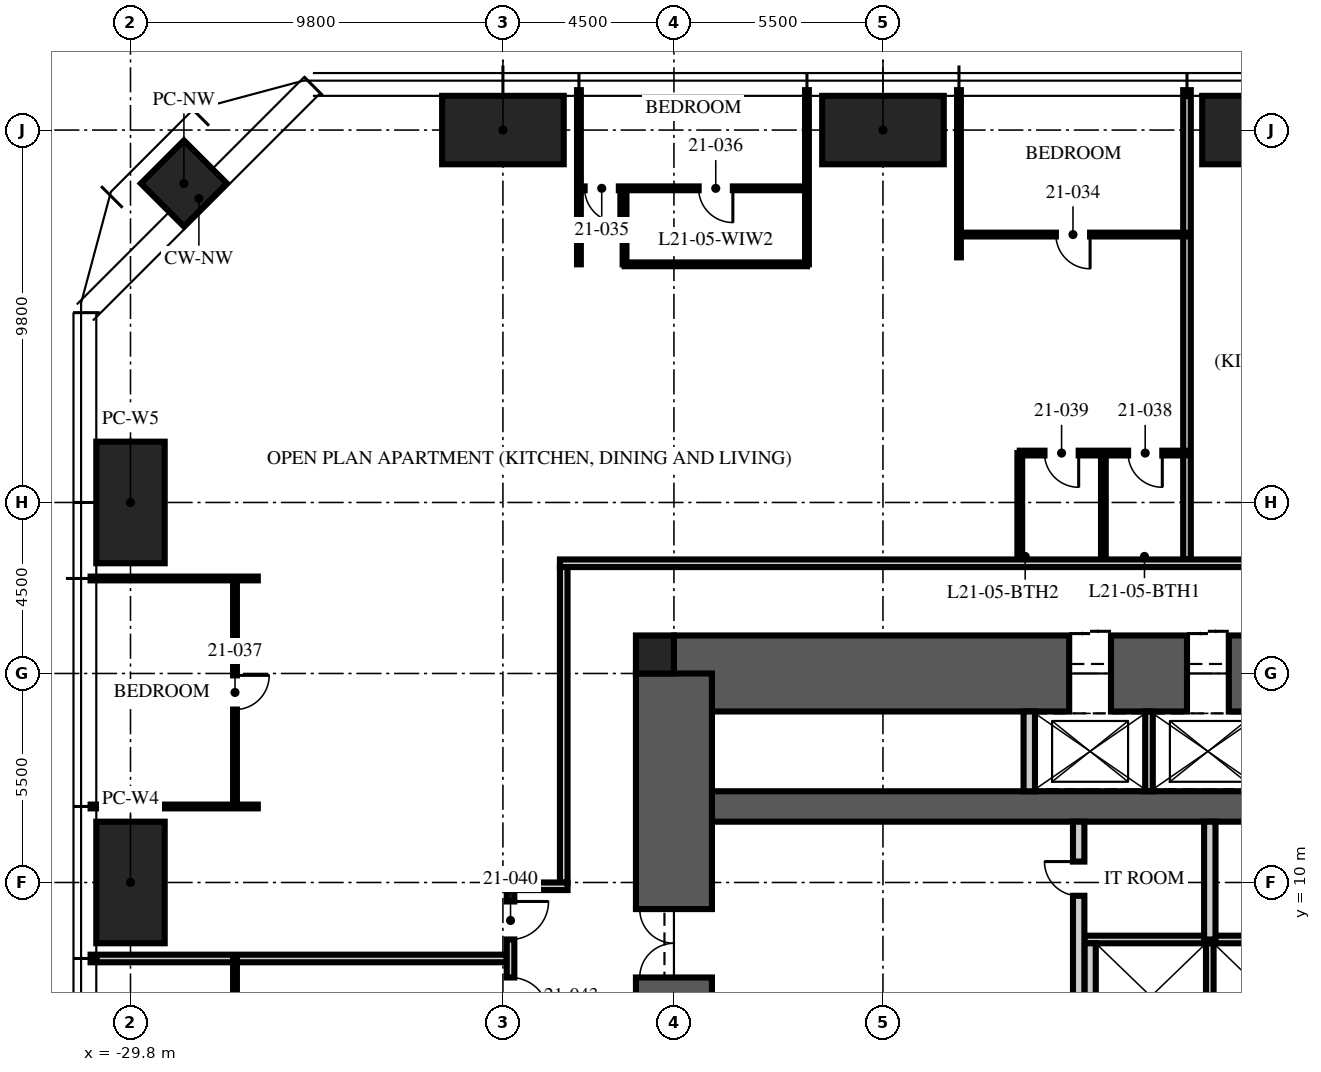
"""IFC4 building model, lengths in metres.
Left out: names, types, materials, properties, quantities, classifications, styles, units other than length and angle.
Written with IfcOpenShell. Run it as: python <this file> out.ifc"""

import sys

from ifc_helpers import new_model, si_unit, direction, frame, frame_2d, origin, origin_2d, place, context, subcontext, project, spatial, rectangle, hollow_rectangle, extrude, element, fill, save


model = new_model("IFC4")
c1 = context("Model", 3, precision=1e-05, world=origin(), true_north=direction((0.0, 1.0)))
c2 = subcontext(c1, "Body", "Model", "MODEL_VIEW")
j1 = project(units=[si_unit("LENGTHUNIT", "METRE"), si_unit("PLANEANGLEUNIT", "RADIAN")], contexts=[c1])
p1 = place(None, origin())
s1 = spatial("IfcSite", under=j1, at=p1, CompositionType="ELEMENT")
p2 = place(p1, origin())
s2 = spatial("IfcBuilding", under=s1, at=p2, CompositionType="ELEMENT")
p3 = place(p2, frame((0.0, 0.0, 84.75)))
s3 = spatial("IfcBuildingStorey", under=s2, at=p3, CompositionType="ELEMENT", Elevation=84.75)
p4 = place(p3, frame((-15.5, 15.5, -0.25), z_axis=(0.0, 0.0, 1.0), x_axis=(1.0, 0.0, 0.0)))
e1 = element("IfcWall", 1, at=p4, inside=s3, PredefinedType="SHEAR", context=c2, shape_type="SweptSolid", body=[
    extrude(rectangle(XDim=31.0, YDim=2.0, at=frame_2d((15.5, 0.0))), origin(), (0.0, 0.0, 1.0), 3.75),
])
p5 = place(p4, frame((10.4, 0.0, 0.25)))
e2 = element("IfcOpeningElement", 2, at=p5, cuts=e1, PredefinedType="OPENING", context=c2, shape_type="SweptSolid", body=[
    extrude(rectangle(XDim=1.1, YDim=2.1, at=frame_2d((0.55, 1.05))), frame((0.0, 1.01, 0.0), z_axis=(0.0, -1.0, 0.0), x_axis=(1.0, 0.0, 0.0)), (0.0, 0.0, 1.0), 2.02),
])
p6 = place(p4, frame((13.5, 0.0, 0.25)))
e3 = element("IfcOpeningElement", 3, at=p6, cuts=e1, PredefinedType="OPENING", context=c2, shape_type="SweptSolid", body=[
    extrude(rectangle(XDim=1.1, YDim=2.1, at=frame_2d((0.55, 1.05))), frame((0.0, 1.01, 0.0), z_axis=(0.0, -1.0, 0.0), x_axis=(1.0, 0.0, 0.0)), (0.0, 0.0, 1.0), 2.02),
])
p7 = place(p4, frame((16.6, 0.0, 0.25)))
e4 = element("IfcOpeningElement", 4, at=p7, cuts=e1, PredefinedType="OPENING", context=c2, shape_type="SweptSolid", body=[
    extrude(rectangle(XDim=1.1, YDim=2.1, at=frame_2d((0.55, 1.05))), frame((0.0, 1.01, 0.0), z_axis=(0.0, -1.0, 0.0), x_axis=(1.0, 0.0, 0.0)), (0.0, 0.0, 1.0), 2.02),
])
p8 = place(p3, frame((-15.5, 12.0, -0.25), z_axis=(0.0, 0.0, 1.0), x_axis=(1.0, 0.0, 0.0)))
e5 = element("IfcWall", 5, at=p8, inside=s3, PredefinedType="SHEAR", context=c2, shape_type="SweptSolid", body=[
    extrude(rectangle(XDim=31.0, YDim=0.8, at=frame_2d((15.5, 0.0))), origin(), (0.0, 0.0, 1.0), 3.75),
])
p9 = place(p3, frame((-15.5, -15.5, -0.25), z_axis=(0.0, 0.0, 1.0), x_axis=(0.0, 1.0, 0.0)))
e6 = element("IfcWall", 6, at=p9, inside=s3, PredefinedType="SHEAR", context=c2, shape_type="SweptSolid", body=[
    extrude(rectangle(XDim=31.0, YDim=2.0, at=frame_2d((15.5, 0.0))), origin(), (0.0, 0.0, 1.0), 3.75),
])
p10 = place(p9, frame((6.5, 0.0, 0.25)))
e7 = element("IfcOpeningElement", 7, at=p10, cuts=e6, PredefinedType="OPENING", context=c2, shape_type="SweptSolid", body=[
    extrude(rectangle(XDim=1.2, YDim=2.1, at=frame_2d((0.6, 1.05))), frame((0.0, 1.01, 0.0), z_axis=(0.0, -1.0, 0.0), x_axis=(1.0, 0.0, 0.0)), (0.0, 0.0, 1.0), 2.02),
])
p11 = place(p9, frame((23.0, 0.0, 0.25)))
e8 = element("IfcOpeningElement", 8, at=p11, cuts=e6, PredefinedType="OPENING", context=c2, shape_type="SweptSolid", body=[
    extrude(rectangle(XDim=1.8, YDim=2.1, at=frame_2d((0.9, 1.05))), frame((0.0, 1.01, 0.0), z_axis=(0.0, -1.0, 0.0), x_axis=(1.0, 0.0, 0.0)), (0.0, 0.0, 1.0), 2.02),
])
p12 = place(p3, frame((-16.0, 16.0, -0.25), z_axis=(0.0, 0.0, 1.0), x_axis=(1.0, 0.0, 0.0)))
e9 = element("IfcColumn", 9, at=p12, inside=s3, PredefinedType="COLUMN", context=c2, shape_type="SweptSolid", body=[
    extrude(rectangle(XDim=1.0, YDim=1.0, at=origin_2d()), origin(), (0.0, 0.0, 1.0), 3.75),
])
for number, where, z_axis, x_axis in (
    (10, (-20.0, 29.8, 0.0), (0.0, 0.0, 1.0), (1.0, 0.0, 0.0)),
    (11, (-10.0, 29.8, 0.0), (0.0, 0.0, 1.0), (1.0, 0.0, 0.0)),
    (12, (0.0, 29.8, 0.0), (0.0, 0.0, 1.0), (1.0, 0.0, 0.0)),
    (13, (-29.8, 10.0, 0.0), (0.0, 0.0, 1.0), (0.0, 1.0, 0.0)),
    (14, (-29.8, 20.0, 0.0), (0.0, 0.0, 1.0), (0.0, 1.0, 0.0)),
):
    element("IfcColumn", number, at=place(p3, frame(where, z_axis=z_axis, x_axis=x_axis)), inside=s3, PredefinedType="COLUMN", context=c2, shape_type="SweptSolid", body=[
        extrude(hollow_rectangle(XDim=3.2, YDim=1.8, WallThickness=0.2, at=origin_2d()), origin(), (0.0, 0.0, 1.0), 3.75),
    ])
p13 = place(p3, frame((-28.394, 28.394, 0.0), z_axis=(0.0, 0.0, 1.0), x_axis=(0.707106781187, 0.707106781187, 0.0)))
e15 = element("IfcColumn", 15, at=p13, inside=s3, PredefinedType="COLUMN", context=c2, shape_type="SweptSolid", body=[
    extrude(hollow_rectangle(XDim=1.6, YDim=1.6, WallThickness=0.1, at=origin_2d()), origin(), (0.0, 0.0, 1.0), 3.75),
])
p14 = place(p3, frame((-4.7, 8.5, 0.0), z_axis=(0.0, 0.0, 1.0), x_axis=(1.0, 0.0, 0.0)))
e16 = element("IfcWall", 16, at=p14, inside=s3, PredefinedType="PARTITIONING", context=c2, shape_type="SweptSolid", body=[
    extrude(rectangle(XDim=9.7, YDim=0.2, at=frame_2d((4.85, 0.0))), origin(), (0.0, 0.0, 1.0), 3.5),
])
p15 = place(p3, frame((-4.55, 5.6, 0.0), z_axis=(0.0, 0.0, 1.0), x_axis=(0.0, 1.0, 0.0)))
e17 = element("IfcWall", 17, at=p15, inside=s3, PredefinedType="PARTITIONING", context=c2, shape_type="SweptSolid", body=[
    extrude(rectangle(XDim=2.8, YDim=0.3, at=frame_2d((1.4, 0.0))), origin(), (0.0, 0.0, 1.0), 3.5),
])
p16 = place(p3, frame((-1.4, 5.6, 0.0), z_axis=(0.0, 0.0, 1.0), x_axis=(0.0, 1.0, 0.0)))
e18 = element("IfcWall", 18, at=p16, inside=s3, PredefinedType="PARTITIONING", context=c2, shape_type="SweptSolid", body=[
    extrude(rectangle(XDim=2.8, YDim=0.2, at=frame_2d((1.4, 0.0))), origin(), (0.0, 0.0, 1.0), 3.5),
])
p17 = place(p3, frame((-6.15, 12.4, 0.0), z_axis=(0.0, 0.0, 1.0), x_axis=(0.0, 1.0, 0.0)))
e19 = element("IfcWall", 19, at=p17, inside=s3, PredefinedType="PARTITIONING", context=c2, shape_type="SweptSolid", body=[
    extrude(rectangle(XDim=2.1, YDim=0.3, at=frame_2d((1.05, 0.0))), origin(), (0.0, 0.0, 1.0), 3.5),
])
p18 = place(p3, frame((-3.0, 12.4, 0.0), z_axis=(0.0, 0.0, 1.0), x_axis=(0.0, 1.0, 0.0)))
e20 = element("IfcWall", 20, at=p18, inside=s3, PredefinedType="PARTITIONING", context=c2, shape_type="SweptSolid", body=[
    extrude(rectangle(XDim=2.1, YDim=0.2, at=frame_2d((1.05, 0.0))), origin(), (0.0, 0.0, 1.0), 3.5),
])
p19 = place(p3, frame((-4.85, 5.3, 0.0), z_axis=(0.0, 0.0, 1.0), x_axis=(0.0, 1.0, 0.0)))
e21 = element("IfcWall", 21, at=p19, inside=s3, PredefinedType="PARTITIONING", context=c2, shape_type="SweptSolid", body=[
    extrude(rectangle(XDim=6.3, YDim=0.3, at=frame_2d((3.15, 0.0))), origin(), (0.0, 0.0, 1.0), 3.5),
])
p20 = place(p19, frame((4.35, 0.0, 0.0)))
e22 = element("IfcOpeningElement", 22, at=p20, cuts=e21, PredefinedType="OPENING", context=c2, shape_type="SweptSolid", body=[
    extrude(rectangle(XDim=0.9, YDim=2.1, at=frame_2d((0.45, 1.05))), frame((0.0, 0.16, 0.0), z_axis=(0.0, -1.0, 0.0), x_axis=(1.0, 0.0, 0.0)), (0.0, 0.0, 1.0), 0.32),
])
p21 = place(p3, frame((-1.4, 8.5, 0.0), z_axis=(0.0, 0.0, 1.0), x_axis=(0.0, 1.0, 0.0)))
e23 = element("IfcWall", 23, at=p21, inside=s3, PredefinedType="PARTITIONING", context=c2, shape_type="SweptSolid", body=[
    extrude(rectangle(XDim=3.1, YDim=0.3, at=frame_2d((1.55, 0.0))), origin(), (0.0, 0.0, 1.0), 3.5),
])
p22 = place(p3, frame((-2.0, 18.5, 0.0), z_axis=(0.0, 0.0, 1.0), x_axis=(0.0, 1.0, 0.0)))
e24 = element("IfcWall", 24, at=p22, inside=s3, PredefinedType="PARTITIONING", context=c2, shape_type="SweptSolid", body=[
    extrude(rectangle(XDim=12.35, YDim=0.2, at=frame_2d((6.175, 0.0))), origin(), (0.0, 0.0, 1.0), 2.71),
])
p23 = place(p3, frame((-8.0, 26.45, 0.0), z_axis=(0.0, 0.0, 1.0), x_axis=(0.0, 1.0, 0.0)))
e25 = element("IfcWall", 25, at=p23, inside=s3, PredefinedType="PARTITIONING", context=c2, shape_type="SweptSolid", body=[
    extrude(rectangle(XDim=4.4, YDim=0.1, at=frame_2d((2.2, 0.0))), origin(), (0.0, 0.0, 1.0), 2.71),
])
for number, where, z_axis, x_axis in (
    (26, (-12.0, 26.267, 0.0), (0.0, 0.0, 1.0), (0.0, 1.0, 0.0)),
    (27, (-18.0, 26.267, 0.0), (0.0, 0.0, 1.0), (0.0, 1.0, 0.0)),
):
    element("IfcWall", number, at=place(p3, frame(where, z_axis=z_axis, x_axis=x_axis)), inside=s3, PredefinedType="PARTITIONING", context=c2, shape_type="SweptSolid", body=[
        extrude(rectangle(XDim=4.583, YDim=0.1, at=frame_2d((2.292, 0.0))), origin(), (0.0, 0.0, 1.0), 2.71),
    ])
for number, where, z_axis, x_axis in (
    (28, (-26.45, 18.0, 0.0), (0.0, 0.0, 1.0), (-1.0, 0.0, 0.0)),
    (29, (-26.45, 12.0, 0.0), (0.0, 0.0, 1.0), (-1.0, 0.0, 0.0)),
):
    element("IfcWall", number, at=place(p3, frame(where, z_axis=z_axis, x_axis=x_axis)), inside=s3, PredefinedType="PARTITIONING", context=c2, shape_type="SweptSolid", body=[
        extrude(rectangle(XDim=4.4, YDim=0.1, at=frame_2d((2.2, 0.0))), origin(), (0.0, 0.0, 1.0), 2.71),
    ])
p24 = place(p3, frame((-19.9, 8.0, 0.0), z_axis=(0.0, 0.0, 1.0), x_axis=(-1.0, 0.0, 0.0)))
e30 = element("IfcWall", 30, at=p24, inside=s3, PredefinedType="PARTITIONING", context=c2, shape_type="SweptSolid", body=[
    extrude(rectangle(XDim=10.95, YDim=0.2, at=frame_2d((5.475, 0.0))), origin(), (0.0, 0.0, 1.0), 2.71),
])
p25 = place(p3, frame((-2.0, 27.05, 0.0), z_axis=(0.0, 0.0, 1.0), x_axis=(-1.0, 0.0, 0.0)))
e31 = element("IfcWall", 31, at=p25, inside=s3, PredefinedType="PARTITIONING", context=c2, shape_type="SweptSolid", body=[
    extrude(rectangle(XDim=6.0, YDim=0.1, at=frame_2d((3.0, 0.0))), origin(), (0.0, 0.0, 1.0), 2.61),
])
p26 = place(p25, frame((2.55, 0.0, 0.0)))
e32 = element("IfcOpeningElement", 32, at=p26, cuts=e31, PredefinedType="OPENING", context=c2, shape_type="SweptSolid", body=[
    extrude(rectangle(XDim=0.9, YDim=2.1, at=frame_2d((0.45, 1.05))), frame((0.0, 0.06, 0.0), z_axis=(0.0, -1.0, 0.0), x_axis=(1.0, 0.0, 0.0)), (0.0, 0.0, 1.0), 0.12),
])
p27 = place(p3, frame((-12.0, 28.267, 0.0), z_axis=(0.0, 0.0, 1.0), x_axis=(-1.0, 0.0, 0.0)))
e33 = element("IfcWall", 33, at=p27, inside=s3, PredefinedType="PARTITIONING", context=c2, shape_type="SweptSolid", body=[
    extrude(rectangle(XDim=6.0, YDim=0.1, at=frame_2d((3.0, 0.0))), origin(), (0.0, 0.0, 1.0), 2.61),
])
p28 = place(p27, frame((4.95, 0.0, 0.0)))
e34 = element("IfcOpeningElement", 34, at=p28, cuts=e33, PredefinedType="OPENING", context=c2, shape_type="SweptSolid", body=[
    extrude(rectangle(XDim=0.9, YDim=2.1, at=frame_2d((0.45, 1.05))), frame((0.0, 0.06, 0.0), z_axis=(0.0, -1.0, 0.0), x_axis=(1.0, 0.0, 0.0)), (0.0, 0.0, 1.0), 0.12),
])
p29 = place(p27, frame((1.95, 0.0, 0.0)))
e35 = element("IfcOpeningElement", 35, at=p29, cuts=e33, PredefinedType="OPENING", context=c2, shape_type="SweptSolid", body=[
    extrude(rectangle(XDim=0.9, YDim=2.1, at=frame_2d((0.45, 1.05))), frame((0.0, 0.06, 0.0), z_axis=(0.0, -1.0, 0.0), x_axis=(1.0, 0.0, 0.0)), (0.0, 0.0, 1.0), 0.12),
])
p30 = place(p3, frame((-16.8, 26.267, 0.0), z_axis=(0.0, 0.0, 1.0), x_axis=(0.0, 1.0, 0.0)))
e36 = element("IfcWall", 36, at=p30, inside=s3, PredefinedType="PARTITIONING", context=c2, shape_type="SweptSolid", body=[
    extrude(rectangle(XDim=2.0, YDim=0.1, at=frame_2d((1.0, 0.0))), origin(), (0.0, 0.0, 1.0), 3.5),
])
p31 = place(p3, frame((-12.0, 26.267, 0.0), z_axis=(0.0, 0.0, 1.0), x_axis=(-1.0, 0.0, 0.0)))
e37 = element("IfcWall", 37, at=p31, inside=s3, PredefinedType="PARTITIONING", context=c2, shape_type="SweptSolid", body=[
    extrude(rectangle(XDim=4.8, YDim=0.1, at=frame_2d((2.4, 0.0))), origin(), (0.0, 0.0, 1.0), 2.61),
])
p32 = place(p3, frame((-27.05, 18.0, 0.0), z_axis=(0.0, 0.0, 1.0), x_axis=(0.0, -1.0, 0.0)))
e38 = element("IfcWall", 38, at=p32, inside=s3, PredefinedType="PARTITIONING", context=c2, shape_type="SweptSolid", body=[
    extrude(rectangle(XDim=6.0, YDim=0.1, at=frame_2d((3.0, 0.0))), origin(), (0.0, 0.0, 1.0), 2.61),
])
p33 = place(p32, frame((2.55, 0.0, 0.0)))
e39 = element("IfcOpeningElement", 39, at=p33, cuts=e38, PredefinedType="OPENING", context=c2, shape_type="SweptSolid", body=[
    extrude(rectangle(XDim=0.9, YDim=2.1, at=frame_2d((0.45, 1.05))), frame((0.0, 0.06, 0.0), z_axis=(0.0, -1.0, 0.0), x_axis=(1.0, 0.0, 0.0)), (0.0, 0.0, 1.0), 0.12),
])
p34 = place(p3, frame((-2.0, 21.3, 0.0), z_axis=(0.0, 0.0, 1.0), x_axis=(-1.0, 0.0, 0.0)))
e40 = element("IfcWall", 40, at=p34, inside=s3, PredefinedType="PARTITIONING", context=c2, shape_type="SweptSolid", body=[
    extrude(rectangle(XDim=4.4, YDim=0.125, at=frame_2d((2.2, 0.0))), origin(), (0.0, 0.0, 1.0), 2.61),
])
p35 = place(p34, frame((0.65, 0.0, 0.0)))
e41 = element("IfcOpeningElement", 41, at=p35, cuts=e40, PredefinedType="OPENING", context=c2, shape_type="SweptSolid", body=[
    extrude(rectangle(XDim=0.9, YDim=2.1, at=frame_2d((0.45, 1.05))), frame((0.0, 0.073, 0.0), z_axis=(0.0, -1.0, 0.0), x_axis=(1.0, 0.0, 0.0)), (0.0, 0.0, 1.0), 0.145),
])
p36 = place(p34, frame((2.85, 0.0, 0.0)))
e42 = element("IfcOpeningElement", 42, at=p36, cuts=e40, PredefinedType="OPENING", context=c2, shape_type="SweptSolid", body=[
    extrude(rectangle(XDim=0.9, YDim=2.1, at=frame_2d((0.45, 1.05))), frame((0.0, 0.073, 0.0), z_axis=(0.0, -1.0, 0.0), x_axis=(1.0, 0.0, 0.0)), (0.0, 0.0, 1.0), 0.145),
])
for number, where, z_axis, x_axis in (
    (43, (-4.2, 18.5, 0.0), (0.0, 0.0, 1.0), (0.0, 1.0, 0.0)),
    (44, (-6.4, 18.5, 0.0), (0.0, 0.0, 1.0), (0.0, 1.0, 0.0)),
):
    element("IfcWall", number, at=place(p3, frame(where, z_axis=z_axis, x_axis=x_axis)), inside=s3, PredefinedType="PARTITIONING", context=c2, shape_type="SweptSolid", body=[
        extrude(rectangle(XDim=2.8, YDim=0.125, at=frame_2d((1.4, 0.0))), origin(), (0.0, 0.0, 1.0), 3.5),
    ])
p37 = place(p3, frame((-27.05, 8.0, 0.0), z_axis=(0.0, 0.0, 1.0), x_axis=(0.0, -1.0, 0.0)))
e45 = element("IfcWall", 45, at=p37, inside=s3, PredefinedType="PARTITIONING", context=c2, shape_type="SweptSolid", body=[
    extrude(rectangle(XDim=6.0, YDim=0.1, at=frame_2d((3.0, 0.0))), origin(), (0.0, 0.0, 1.0), 2.61),
])
p38 = place(p37, frame((2.55, 0.0, 0.0)))
e46 = element("IfcOpeningElement", 46, at=p38, cuts=e45, PredefinedType="OPENING", context=c2, shape_type="SweptSolid", body=[
    extrude(rectangle(XDim=0.9, YDim=2.1, at=frame_2d((0.45, 1.05))), frame((0.0, 0.06, 0.0), z_axis=(0.0, -1.0, 0.0), x_axis=(1.0, 0.0, 0.0)), (0.0, 0.0, 1.0), 0.12),
])
p39 = place(p3, frame((-18.5, 18.4, 0.0), z_axis=(0.0, 0.0, 1.0), x_axis=(1.0, 0.0, 0.0)))
e47 = element("IfcWall", 47, at=p39, inside=s3, PredefinedType="PARTITIONING", context=c2, shape_type="SweptSolid", body=[
    extrude(rectangle(XDim=24.5, YDim=0.2, at=frame_2d((12.25, 0.0))), origin(), (0.0, 0.0, 1.0), 2.3),
])
p40 = place(p3, frame((-18.4, 18.3, 0.0), z_axis=(0.0, 0.0, 1.0), x_axis=(0.0, -1.0, 0.0)))
e48 = element("IfcWall", 48, at=p40, inside=s3, PredefinedType="PARTITIONING", context=c2, shape_type="SweptSolid", body=[
    extrude(rectangle(XDim=8.3, YDim=0.2, at=frame_2d((4.15, 0.0))), origin(), (0.0, 0.0, 1.0), 2.3),
])
p41 = place(p3, frame((-18.3, 9.9, 0.0), z_axis=(0.0, 0.0, 1.0), x_axis=(-1.0, 0.0, 0.0)))
e49 = element("IfcWall", 49, at=p41, inside=s3, PredefinedType="PARTITIONING", context=c2, shape_type="SweptSolid", body=[
    extrude(rectangle(XDim=1.6, YDim=0.2, at=frame_2d((0.8, 0.0))), origin(), (0.0, 0.0, 1.0), 2.492),
])
p42 = place(p3, frame((-19.8, 9.8, 0.0), z_axis=(0.0, 0.0, 1.0), x_axis=(0.0, -1.0, 0.0)))
e50 = element("IfcWall", 50, at=p42, inside=s3, PredefinedType="PARTITIONING", context=c2, shape_type="SweptSolid", body=[
    extrude(rectangle(XDim=3.6, YDim=0.2, at=frame_2d((1.8, 0.0))), origin(), (0.0, 0.0, 1.0), 3.5),
])
p43 = place(p42, frame((0.3, 0.0, 0.0)))
e51 = element("IfcOpeningElement", 51, at=p43, cuts=e50, PredefinedType="OPENING", context=c2, shape_type="SweptSolid", body=[
    extrude(rectangle(XDim=1.0, YDim=2.2, at=frame_2d((0.5, 1.1))), frame((0.0, 0.11, 0.0), z_axis=(0.0, -1.0, 0.0), x_axis=(1.0, 0.0, 0.0)), (0.0, 0.0, 1.0), 0.22),
])
p44 = place(p42, frame((2.3, 0.0, 0.0)))
e52 = element("IfcOpeningElement", 52, at=p44, cuts=e50, PredefinedType="OPENING", context=c2, shape_type="SweptSolid", body=[
    extrude(rectangle(XDim=1.0, YDim=2.2, at=frame_2d((0.5, 1.1))), frame((0.0, 0.11, 0.0), z_axis=(0.0, -1.0, 0.0), x_axis=(1.0, 0.0, 0.0)), (0.0, 0.0, 1.0), 0.22),
])
p45 = place(p11, origin())
e53 = element("IfcDoor", 53, at=p45, inside=s3, OperationType="DOUBLE_DOOR_SINGLE_SWING", PredefinedType="DOOR", context=c2, shape_type="SweptSolid", body=[
    extrude(rectangle(XDim=1.8, YDim=2.1, at=frame_2d((0.9, 1.05))), frame((0.0, 0.025, 0.0), z_axis=(0.0, -1.0, 0.0), x_axis=(1.0, 0.0, 0.0)), (0.0, 0.0, 1.0), 0.05),
])
fill(e8, e53)
p46 = place(p5, origin())
e54 = element("IfcDoor", 54, at=p46, inside=s3, OperationType="DOUBLE_DOOR_SLIDING", PredefinedType="DOOR", context=c2, shape_type="SweptSolid", body=[
    extrude(rectangle(XDim=1.1, YDim=2.1, at=frame_2d((0.55, 1.05))), frame((0.0, 0.025, 0.0), z_axis=(0.0, -1.0, 0.0), x_axis=(1.0, 0.0, 0.0)), (0.0, 0.0, 1.0), 0.05),
])
fill(e2, e54)
p47 = place(p6, origin())
e55 = element("IfcDoor", 55, at=p47, inside=s3, OperationType="DOUBLE_DOOR_SLIDING", PredefinedType="DOOR", context=c2, shape_type="SweptSolid", body=[
    extrude(rectangle(XDim=1.1, YDim=2.1, at=frame_2d((0.55, 1.05))), frame((0.0, 0.025, 0.0), z_axis=(0.0, -1.0, 0.0), x_axis=(1.0, 0.0, 0.0)), (0.0, 0.0, 1.0), 0.05),
])
fill(e3, e55)
p48 = place(p20, origin())
e56 = element("IfcDoor", 56, at=p48, inside=s3, OperationType="SINGLE_SWING_RIGHT", PredefinedType="DOOR", context=c2, shape_type="SweptSolid", body=[
    extrude(rectangle(XDim=0.9, YDim=2.1, at=frame_2d((0.45, 1.05))), frame((0.0, 0.025, 0.0), z_axis=(0.0, -1.0, 0.0), x_axis=(1.0, 0.0, 0.0)), (0.0, 0.0, 1.0), 0.05),
])
fill(e22, e56)
p49 = place(p26, origin())
e57 = element("IfcDoor", 57, at=p49, inside=s3, OperationType="SINGLE_SWING_LEFT", PredefinedType="DOOR", context=c2, shape_type="SweptSolid", body=[
    extrude(rectangle(XDim=0.9, YDim=2.1, at=frame_2d((0.45, 1.05))), frame((0.0, 0.025, 0.0), z_axis=(0.0, -1.0, 0.0), x_axis=(1.0, 0.0, 0.0)), (0.0, 0.0, 1.0), 0.05),
])
fill(e32, e57)
p50 = place(p28, origin())
e58 = element("IfcDoor", 58, at=p50, inside=s3, OperationType="SINGLE_SWING_LEFT", PredefinedType="DOOR", context=c2, shape_type="SweptSolid", body=[
    extrude(rectangle(XDim=0.9, YDim=2.1, at=frame_2d((0.45, 1.05))), frame((0.0, 0.025, 0.0), z_axis=(0.0, -1.0, 0.0), x_axis=(1.0, 0.0, 0.0)), (0.0, 0.0, 1.0), 0.05),
])
fill(e34, e58)
p51 = place(p29, origin())
e59 = element("IfcDoor", 59, at=p51, inside=s3, OperationType="SINGLE_SWING_LEFT", PredefinedType="DOOR", context=c2, shape_type="SweptSolid", body=[
    extrude(rectangle(XDim=0.9, YDim=2.1, at=frame_2d((0.45, 1.05))), frame((0.0, 0.025, 0.0), z_axis=(0.0, -1.0, 0.0), x_axis=(1.0, 0.0, 0.0)), (0.0, 0.0, 1.0), 0.05),
])
fill(e35, e59)
p52 = place(p33, origin())
e60 = element("IfcDoor", 60, at=p52, inside=s3, OperationType="SINGLE_SWING_LEFT", PredefinedType="DOOR", context=c2, shape_type="SweptSolid", body=[
    extrude(rectangle(XDim=0.9, YDim=2.1, at=frame_2d((0.45, 1.05))), frame((0.0, 0.025, 0.0), z_axis=(0.0, -1.0, 0.0), x_axis=(1.0, 0.0, 0.0)), (0.0, 0.0, 1.0), 0.05),
])
fill(e39, e60)
p53 = place(p35, origin())
e61 = element("IfcDoor", 61, at=p53, inside=s3, OperationType="SINGLE_SWING_LEFT", PredefinedType="DOOR", context=c2, shape_type="SweptSolid", body=[
    extrude(rectangle(XDim=0.9, YDim=2.1, at=frame_2d((0.45, 1.05))), frame((0.0, 0.025, 0.0), z_axis=(0.0, -1.0, 0.0), x_axis=(1.0, 0.0, 0.0)), (0.0, 0.0, 1.0), 0.05),
])
fill(e41, e61)
p54 = place(p36, origin())
e62 = element("IfcDoor", 62, at=p54, inside=s3, OperationType="SINGLE_SWING_LEFT", PredefinedType="DOOR", context=c2, shape_type="SweptSolid", body=[
    extrude(rectangle(XDim=0.9, YDim=2.1, at=frame_2d((0.45, 1.05))), frame((0.0, 0.025, 0.0), z_axis=(0.0, -1.0, 0.0), x_axis=(1.0, 0.0, 0.0)), (0.0, 0.0, 1.0), 0.05),
])
fill(e42, e62)
p55 = place(p43, origin())
e63 = element("IfcDoor", 63, at=p55, inside=s3, OperationType="SINGLE_SWING_LEFT", PredefinedType="DOOR", context=c2, shape_type="SweptSolid", body=[
    extrude(rectangle(XDim=1.0, YDim=2.2, at=frame_2d((0.5, 1.1))), frame((0.0, 0.025, 0.0), z_axis=(0.0, -1.0, 0.0), x_axis=(1.0, 0.0, 0.0)), (0.0, 0.0, 1.0), 0.05),
])
fill(e51, e63)
p56 = place(p44, origin())
e64 = element("IfcDoor", 64, at=p56, inside=s3, OperationType="SINGLE_SWING_RIGHT", PredefinedType="DOOR", context=c2, shape_type="SweptSolid", body=[
    extrude(rectangle(XDim=1.0, YDim=2.2, at=frame_2d((0.5, 1.1))), frame((0.0, 0.025, 0.0), z_axis=(0.0, -1.0, 0.0), x_axis=(1.0, 0.0, 0.0)), (0.0, 0.0, 1.0), 0.05),
])
fill(e52, e64)
save(model, sys.argv[1])
